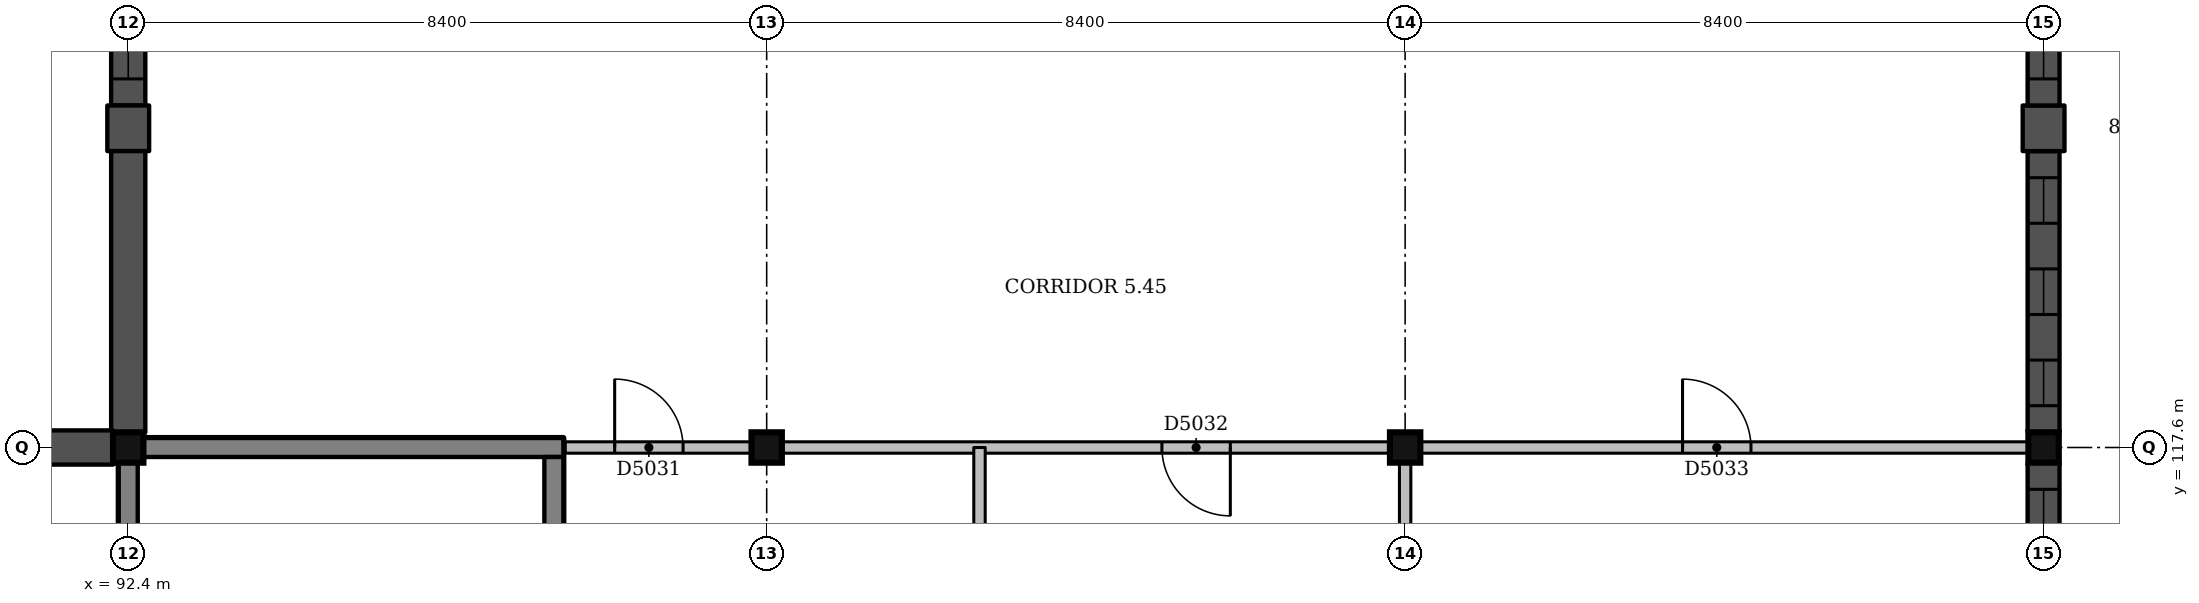
"""IFC4 building model, lengths in metres.
Left out: names, types, materials, properties, quantities, classifications, styles, units other than length and angle.
Written with IfcOpenShell. Run it as: python <this file> out.ifc"""

import sys

from ifc_helpers import new_model, si_unit, direction, frame, frame_2d, origin, origin_2d, place, context, subcontext, project, spatial, rectangle, extrude, element, fill, save


model = new_model("IFC4")
c1 = context("Model", 3, precision=1e-05, world=origin(), true_north=direction((0.0, 1.0)))
c2 = subcontext(c1, "Body", "Model", "MODEL_VIEW")
j1 = project(units=[si_unit("LENGTHUNIT", "METRE"), si_unit("PLANEANGLEUNIT", "RADIAN")], contexts=[c1])
p1 = place(None, origin())
s1 = spatial("IfcSite", under=j1, at=p1, CompositionType="ELEMENT")
p2 = place(p1, origin())
s2 = spatial("IfcBuilding", under=s1, at=p2, CompositionType="ELEMENT")
p3 = place(p2, frame((0.0, 0.0, 22.5)))
s3 = spatial("IfcBuildingStorey", under=s2, at=p3, CompositionType="ELEMENT", Elevation=22.5)
for number, where, z_axis, x_axis in (
    (1, (92.4, 117.6, 0.0), (0.0, 0.0, 1.0), (1.0, 0.0, 0.0)),
    (2, (100.8, 117.6, 0.0), (0.0, 0.0, 1.0), (1.0, 0.0, 0.0)),
    (3, (109.2, 117.6, 0.0), (0.0, 0.0, 1.0), (1.0, 0.0, 0.0)),
    (4, (117.6, 117.6, 0.0), (0.0, 0.0, 1.0), (1.0, 0.0, 0.0)),
):
    element("IfcColumn", number, at=place(p3, frame(where, z_axis=z_axis, x_axis=x_axis)), inside=s3, PredefinedType="COLUMN", context=c2, shape_type="SweptSolid", body=[
        extrude(rectangle(XDim=0.4, YDim=0.4, at=origin_2d()), origin(), (0.0, 0.0, 1.0), 4.5),
    ])
p4 = place(p3, frame((92.6, 117.6, 0.0), z_axis=(0.0, 0.0, 1.0), x_axis=(1.0, 0.0, 0.0)))
e5 = element("IfcWall", 5, at=p4, inside=s3, PredefinedType="SHEAR", context=c2, shape_type="SweptSolid", body=[
    extrude(rectangle(XDim=5.525, YDim=0.25, at=frame_2d((2.762, 0.0))), origin(), (0.0, 0.0, 1.0), 4.2),
])
p5 = place(p3, frame((92.4, 109.4, 0.0), z_axis=(0.0, 0.0, 1.0), x_axis=(0.0, 1.0, 0.0)))
e6 = element("IfcWall", 6, at=p5, inside=s3, PredefinedType="SHEAR", context=c2, shape_type="SweptSolid", body=[
    extrude(rectangle(XDim=8.0, YDim=0.25, at=frame_2d((4.0, 0.0))), origin(), (0.0, 0.0, 1.0), 4.2),
])
p6 = place(p5, frame((0.45, 0.0, 0.0)))
e7 = element("IfcOpeningElement", 7, at=p6, cuts=e6, PredefinedType="OPENING", context=c2, shape_type="SweptSolid", body=[
    extrude(rectangle(XDim=1.0, YDim=2.1, at=frame_2d((0.5, 1.05))), frame((0.0, 0.135, 0.0), z_axis=(0.0, -1.0, 0.0), x_axis=(1.0, 0.0, 0.0)), (0.0, 0.0, 1.0), 0.27),
])
p7 = place(p3, frame((98.0, 109.325, 0.0), z_axis=(0.0, 0.0, 1.0), x_axis=(0.0, 1.0, 0.0)))
e8 = element("IfcWall", 8, at=p7, inside=s3, PredefinedType="SHEAR", context=c2, shape_type="SweptSolid", body=[
    extrude(rectangle(XDim=8.15, YDim=0.25, at=frame_2d((4.075, 0.0))), origin(), (0.0, 0.0, 1.0), 4.2),
])
p8 = place(p3, frame((92.4, 125.8, 0.0), z_axis=(0.0, 0.0, 1.0), x_axis=(0.0, -1.0, 0.0)))
e9 = element("IfcWall", 9, at=p8, inside=s3, PredefinedType="SOLIDWALL", context=c2, shape_type="SweptSolid", body=[
    extrude(rectangle(XDim=3.7, YDim=0.45, at=frame_2d((1.85, 0.0))), origin(), (0.0, 0.0, 1.0), 3.6),
])
p9 = place(p8, frame((0.35, 0.0, 0.9)))
e10 = element("IfcOpeningElement", 10, at=p9, cuts=e9, PredefinedType="OPENING", context=c2, shape_type="SweptSolid", body=[
    extrude(rectangle(XDim=3.0, YDim=2.1, at=frame_2d((1.5, 1.05))), frame((0.0, 0.235, 0.0), z_axis=(0.0, -1.0, 0.0), x_axis=(1.0, 0.0, 0.0)), (0.0, 0.0, 1.0), 0.47),
])
p10 = place(p3, frame((92.4, 122.1, 0.0), z_axis=(0.0, 0.0, 1.0), x_axis=(0.0, -1.0, 0.0)))
e11 = element("IfcWall", 11, at=p10, inside=s3, PredefinedType="SOLIDWALL", context=c2, shape_type="SweptSolid", body=[
    extrude(rectangle(XDim=0.6, YDim=0.55, at=frame_2d((0.3, 0.0))), origin(), (0.0, 0.0, 1.0), 3.6),
])
for number, where, z_axis, x_axis in (
    (12, (92.4, 121.5, 0.0), (0.0, 0.0, 1.0), (0.0, -1.0, 0.0)),
    (13, (92.2, 117.6, 0.0), (0.0, 0.0, 1.0), (-1.0, 0.0, 0.0)),
):
    element("IfcWall", number, at=place(p3, frame(where, z_axis=z_axis, x_axis=x_axis)), inside=s3, PredefinedType="SOLIDWALL", context=c2, shape_type="SweptSolid", body=[
        extrude(rectangle(XDim=3.7, YDim=0.45, at=frame_2d((1.85, 0.0))), origin(), (0.0, 0.0, 1.0), 3.6),
    ])
p11 = place(p3, frame((117.6, 113.7, 0.0), z_axis=(0.0, 0.0, 1.0), x_axis=(0.0, 1.0, 0.0)))
e14 = element("IfcWall", 14, at=p11, inside=s3, PredefinedType="SOLIDWALL", context=c2, shape_type="SweptSolid", body=[
    extrude(rectangle(XDim=3.7, YDim=0.42, at=frame_2d((1.85, 0.0))), origin(), (0.0, 0.0, 1.0), 4.2),
])
p12 = place(p11, frame((0.35, 0.0, 1.0)))
e15 = element("IfcOpeningElement", 15, at=p12, cuts=e14, PredefinedType="OPENING", context=c2, shape_type="SweptSolid", body=[
    extrude(rectangle(XDim=0.6, YDim=2.1, at=frame_2d((0.3, 1.05))), frame((0.0, 0.22, 0.0), z_axis=(0.0, -1.0, 0.0), x_axis=(1.0, 0.0, 0.0)), (0.0, 0.0, 1.0), 0.44),
])
p13 = place(p11, frame((1.55, 0.0, 1.0)))
e16 = element("IfcOpeningElement", 16, at=p13, cuts=e14, PredefinedType="OPENING", context=c2, shape_type="SweptSolid", body=[
    extrude(rectangle(XDim=0.6, YDim=2.1, at=frame_2d((0.3, 1.05))), frame((0.0, 0.22, 0.0), z_axis=(0.0, -1.0, 0.0), x_axis=(1.0, 0.0, 0.0)), (0.0, 0.0, 1.0), 0.44),
])
p14 = place(p11, frame((2.75, 0.0, 1.0)))
e17 = element("IfcOpeningElement", 17, at=p14, cuts=e14, PredefinedType="OPENING", context=c2, shape_type="SweptSolid", body=[
    extrude(rectangle(XDim=0.6, YDim=2.1, at=frame_2d((0.3, 1.05))), frame((0.0, 0.22, 0.0), z_axis=(0.0, -1.0, 0.0), x_axis=(1.0, 0.0, 0.0)), (0.0, 0.0, 1.0), 0.44),
])
p15 = place(p3, frame((117.6, 117.8, 0.0), z_axis=(0.0, 0.0, 1.0), x_axis=(0.0, 1.0, 0.0)))
e18 = element("IfcWall", 18, at=p15, inside=s3, PredefinedType="SOLIDWALL", context=c2, shape_type="SweptSolid", body=[
    extrude(rectangle(XDim=3.7, YDim=0.42, at=frame_2d((1.85, 0.0))), origin(), (0.0, 0.0, 1.0), 3.6),
])
p16 = place(p15, frame((0.35, 0.0, 1.0)))
e19 = element("IfcOpeningElement", 19, at=p16, cuts=e18, PredefinedType="OPENING", context=c2, shape_type="SweptSolid", body=[
    extrude(rectangle(XDim=0.6, YDim=2.1, at=frame_2d((0.3, 1.05))), frame((0.0, 0.22, 0.0), z_axis=(0.0, -1.0, 0.0), x_axis=(1.0, 0.0, 0.0)), (0.0, 0.0, 1.0), 0.44),
])
p17 = place(p15, frame((1.55, 0.0, 1.0)))
e20 = element("IfcOpeningElement", 20, at=p17, cuts=e18, PredefinedType="OPENING", context=c2, shape_type="SweptSolid", body=[
    extrude(rectangle(XDim=0.6, YDim=2.1, at=frame_2d((0.3, 1.05))), frame((0.0, 0.22, 0.0), z_axis=(0.0, -1.0, 0.0), x_axis=(1.0, 0.0, 0.0)), (0.0, 0.0, 1.0), 0.44),
])
p18 = place(p15, frame((2.75, 0.0, 1.0)))
e21 = element("IfcOpeningElement", 21, at=p18, cuts=e18, PredefinedType="OPENING", context=c2, shape_type="SweptSolid", body=[
    extrude(rectangle(XDim=0.6, YDim=2.1, at=frame_2d((0.3, 1.05))), frame((0.0, 0.22, 0.0), z_axis=(0.0, -1.0, 0.0), x_axis=(1.0, 0.0, 0.0)), (0.0, 0.0, 1.0), 0.44),
])
p19 = place(p3, frame((117.6, 121.5, 0.0), z_axis=(0.0, 0.0, 1.0), x_axis=(0.0, 1.0, 0.0)))
e22 = element("IfcWall", 22, at=p19, inside=s3, PredefinedType="SOLIDWALL", context=c2, shape_type="SweptSolid", body=[
    extrude(rectangle(XDim=0.6, YDim=0.55, at=frame_2d((0.3, 0.0))), origin(), (0.0, 0.0, 1.0), 3.6),
])
p20 = place(p3, frame((117.6, 122.1, 0.0), z_axis=(0.0, 0.0, 1.0), x_axis=(0.0, 1.0, 0.0)))
e23 = element("IfcWall", 23, at=p20, inside=s3, PredefinedType="SOLIDWALL", context=c2, shape_type="SweptSolid", body=[
    extrude(rectangle(XDim=3.7, YDim=0.42, at=frame_2d((1.85, 0.0))), origin(), (0.0, 0.0, 1.0), 3.6),
])
p21 = place(p20, frame((0.35, 0.0, 1.0)))
e24 = element("IfcOpeningElement", 24, at=p21, cuts=e23, PredefinedType="OPENING", context=c2, shape_type="SweptSolid", body=[
    extrude(rectangle(XDim=0.6, YDim=2.1, at=frame_2d((0.3, 1.05))), frame((0.0, 0.22, 0.0), z_axis=(0.0, -1.0, 0.0), x_axis=(1.0, 0.0, 0.0)), (0.0, 0.0, 1.0), 0.44),
])
p22 = place(p20, frame((1.55, 0.0, 1.0)))
e25 = element("IfcOpeningElement", 25, at=p22, cuts=e23, PredefinedType="OPENING", context=c2, shape_type="SweptSolid", body=[
    extrude(rectangle(XDim=0.6, YDim=2.1, at=frame_2d((0.3, 1.05))), frame((0.0, 0.22, 0.0), z_axis=(0.0, -1.0, 0.0), x_axis=(1.0, 0.0, 0.0)), (0.0, 0.0, 1.0), 0.44),
])
p23 = place(p20, frame((2.75, 0.0, 1.0)))
e26 = element("IfcOpeningElement", 26, at=p23, cuts=e23, PredefinedType="OPENING", context=c2, shape_type="SweptSolid", body=[
    extrude(rectangle(XDim=0.6, YDim=2.1, at=frame_2d((0.3, 1.05))), frame((0.0, 0.22, 0.0), z_axis=(0.0, -1.0, 0.0), x_axis=(1.0, 0.0, 0.0)), (0.0, 0.0, 1.0), 0.44),
])
p24 = place(p3, frame((98.15, 117.6, 0.0), z_axis=(0.0, 0.0, 1.0), x_axis=(1.0, 0.0, 0.0)))
e27 = element("IfcWall", 27, at=p24, inside=s3, PredefinedType="PARTITIONING", context=c2, shape_type="SweptSolid", body=[
    extrude(rectangle(XDim=2.45, YDim=0.15, at=frame_2d((1.225, 0.0))), origin(), (0.0, 0.0, 1.0), 3.6),
])
p25 = place(p24, frame((0.65, 0.0, 0.0)))
e28 = element("IfcOpeningElement", 28, at=p25, cuts=e27, PredefinedType="OPENING", context=c2, shape_type="SweptSolid", body=[
    extrude(rectangle(XDim=0.9, YDim=2.1, at=frame_2d((0.45, 1.05))), frame((0.0, 0.085, 0.0), z_axis=(0.0, -1.0, 0.0), x_axis=(1.0, 0.0, 0.0)), (0.0, 0.0, 1.0), 0.17),
])
p26 = place(p3, frame((101.0, 117.6, 0.0), z_axis=(0.0, 0.0, 1.0), x_axis=(1.0, 0.0, 0.0)))
e29 = element("IfcWall", 29, at=p26, inside=s3, PredefinedType="PARTITIONING", context=c2, shape_type="SweptSolid", body=[
    extrude(rectangle(XDim=8.0, YDim=0.15, at=frame_2d((4.0, 0.0))), origin(), (0.0, 0.0, 1.0), 3.6),
])
p27 = place(p26, frame((5.0, 0.0, 0.0)))
e30 = element("IfcOpeningElement", 30, at=p27, cuts=e29, PredefinedType="OPENING", context=c2, shape_type="SweptSolid", body=[
    extrude(rectangle(XDim=0.9, YDim=2.1, at=frame_2d((0.45, 1.05))), frame((0.0, 0.085, 0.0), z_axis=(0.0, -1.0, 0.0), x_axis=(1.0, 0.0, 0.0)), (0.0, 0.0, 1.0), 0.17),
])
p28 = place(p3, frame((109.4, 117.6, 0.0), z_axis=(0.0, 0.0, 1.0), x_axis=(1.0, 0.0, 0.0)))
e31 = element("IfcWall", 31, at=p28, inside=s3, PredefinedType="PARTITIONING", context=c2, shape_type="SweptSolid", body=[
    extrude(rectangle(XDim=8.0, YDim=0.15, at=frame_2d((4.0, 0.0))), origin(), (0.0, 0.0, 1.0), 3.6),
])
p29 = place(p28, frame((3.45, 0.0, 0.0)))
e32 = element("IfcOpeningElement", 32, at=p29, cuts=e31, PredefinedType="OPENING", context=c2, shape_type="SweptSolid", body=[
    extrude(rectangle(XDim=0.9, YDim=2.1, at=frame_2d((0.45, 1.05))), frame((0.0, 0.085, 0.0), z_axis=(0.0, -1.0, 0.0), x_axis=(1.0, 0.0, 0.0)), (0.0, 0.0, 1.0), 0.17),
])
p30 = place(p3, frame((103.6, 109.425, 0.0), z_axis=(0.0, 0.0, 1.0), x_axis=(0.0, 1.0, 0.0)))
e33 = element("IfcWall", 33, at=p30, inside=s3, PredefinedType="PARTITIONING", context=c2, shape_type="SweptSolid", body=[
    extrude(rectangle(XDim=8.175, YDim=0.15, at=frame_2d((4.087, 0.0))), origin(), (0.0, 0.0, 1.0), 3.6),
])
p31 = place(p3, frame((109.2, 109.4, 0.0), z_axis=(0.0, 0.0, 1.0), x_axis=(0.0, 1.0, 0.0)))
e34 = element("IfcWall", 34, at=p31, inside=s3, PredefinedType="PARTITIONING", context=c2, shape_type="SweptSolid", body=[
    extrude(rectangle(XDim=8.0, YDim=0.15, at=frame_2d((4.0, 0.0))), origin(), (0.0, 0.0, 1.0), 4.15),
])
p32 = place(p9, origin())
e35 = element("IfcWindow", 35, at=p32, inside=s3, PartitioningType="SINGLE_PANEL", PredefinedType="WINDOW", context=c2, shape_type="SweptSolid", body=[
    extrude(rectangle(XDim=3.0, YDim=2.1, at=frame_2d((1.5, 1.05))), frame((0.0, 0.135, 0.0), z_axis=(0.0, -1.0, 0.0), x_axis=(1.0, 0.0, 0.0)), (0.0, 0.0, 1.0), 0.06),
])
fill(e10, e35)
p33 = place(p14, origin())
e36 = element("IfcWindow", 36, at=p33, inside=s3, PartitioningType="SINGLE_PANEL", PredefinedType="WINDOW", context=c2, shape_type="SweptSolid", body=[
    extrude(rectangle(XDim=0.6, YDim=2.1, at=frame_2d((0.3, 1.05))), frame((0.0, 0.15, 0.0), z_axis=(0.0, -1.0, 0.0), x_axis=(1.0, 0.0, 0.0)), (0.0, 0.0, 1.0), 0.06),
])
fill(e17, e36)
p34 = place(p16, origin())
e37 = element("IfcWindow", 37, at=p34, inside=s3, PartitioningType="SINGLE_PANEL", PredefinedType="WINDOW", context=c2, shape_type="SweptSolid", body=[
    extrude(rectangle(XDim=0.6, YDim=2.1, at=frame_2d((0.3, 1.05))), frame((0.0, 0.15, 0.0), z_axis=(0.0, -1.0, 0.0), x_axis=(1.0, 0.0, 0.0)), (0.0, 0.0, 1.0), 0.06),
])
fill(e19, e37)
p35 = place(p17, origin())
e38 = element("IfcWindow", 38, at=p35, inside=s3, PartitioningType="SINGLE_PANEL", PredefinedType="WINDOW", context=c2, shape_type="SweptSolid", body=[
    extrude(rectangle(XDim=0.6, YDim=2.1, at=frame_2d((0.3, 1.05))), frame((0.0, 0.15, 0.0), z_axis=(0.0, -1.0, 0.0), x_axis=(1.0, 0.0, 0.0)), (0.0, 0.0, 1.0), 0.06),
])
fill(e20, e38)
p36 = place(p18, origin())
e39 = element("IfcWindow", 39, at=p36, inside=s3, PartitioningType="SINGLE_PANEL", PredefinedType="WINDOW", context=c2, shape_type="SweptSolid", body=[
    extrude(rectangle(XDim=0.6, YDim=2.1, at=frame_2d((0.3, 1.05))), frame((0.0, 0.15, 0.0), z_axis=(0.0, -1.0, 0.0), x_axis=(1.0, 0.0, 0.0)), (0.0, 0.0, 1.0), 0.06),
])
fill(e21, e39)
p37 = place(p21, origin())
e40 = element("IfcWindow", 40, at=p37, inside=s3, PartitioningType="SINGLE_PANEL", PredefinedType="WINDOW", context=c2, shape_type="SweptSolid", body=[
    extrude(rectangle(XDim=0.6, YDim=2.1, at=frame_2d((0.3, 1.05))), frame((0.0, 0.15, 0.0), z_axis=(0.0, -1.0, 0.0), x_axis=(1.0, 0.0, 0.0)), (0.0, 0.0, 1.0), 0.06),
])
fill(e24, e40)
p38 = place(p3, frame((0.0, 0.0, 4.2)))
p39 = place(p38, frame((105.0, 121.8, 0.0)))
p40 = place(p39, frame((0.0, 0.0, 0.25)))
e41 = element("IfcWindow", 41, at=p40, inside=s3, PartitioningType="SINGLE_PANEL", PredefinedType="SKYLIGHT", context=c2, shape_type="SweptSolid", body=[
    extrude(rectangle(XDim=0.9, YDim=1.2, at=origin_2d()), origin(), (0.0, 0.0, 1.0), 0.05),
])
p41 = place(p25, origin())
e42 = element("IfcDoor", 42, at=p41, inside=s3, OperationType="SINGLE_SWING_LEFT", PredefinedType="DOOR", context=c2, shape_type="SweptSolid", body=[
    extrude(rectangle(XDim=0.9, YDim=2.1, at=frame_2d((0.45, 1.05))), frame((0.0, 0.025, 0.0), z_axis=(0.0, -1.0, 0.0), x_axis=(1.0, 0.0, 0.0)), (0.0, 0.0, 1.0), 0.05),
])
fill(e28, e42)
p42 = place(p27, origin())
e43 = element("IfcDoor", 43, at=p42, inside=s3, OperationType="SINGLE_SWING_RIGHT", PredefinedType="DOOR", context=c2, shape_type="SweptSolid", body=[
    extrude(rectangle(XDim=0.9, YDim=2.1, at=frame_2d((0.45, 1.05))), frame((0.0, 0.025, 0.0), z_axis=(0.0, -1.0, 0.0), x_axis=(1.0, 0.0, 0.0)), (0.0, 0.0, 1.0), 0.05),
])
fill(e30, e43)
p43 = place(p29, origin())
e44 = element("IfcDoor", 44, at=p43, inside=s3, OperationType="SINGLE_SWING_LEFT", PredefinedType="DOOR", context=c2, shape_type="SweptSolid", body=[
    extrude(rectangle(XDim=0.9, YDim=2.1, at=frame_2d((0.45, 1.05))), frame((0.0, 0.025, 0.0), z_axis=(0.0, -1.0, 0.0), x_axis=(1.0, 0.0, 0.0)), (0.0, 0.0, 1.0), 0.05),
])
fill(e32, e44)
save(model, sys.argv[1])
